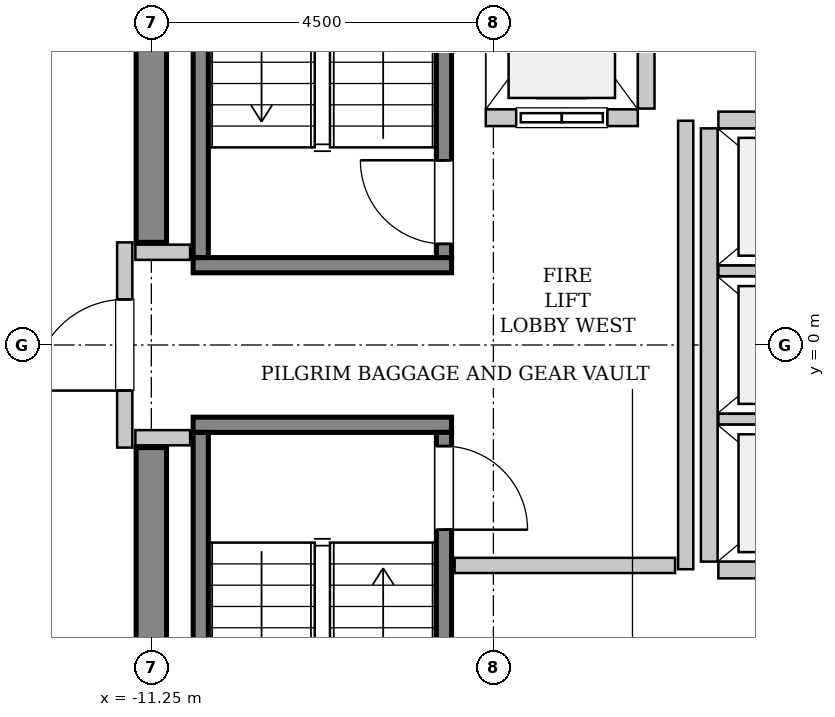
"""IFC4 building model, lengths in metres.
Left out: names, types, materials, properties, quantities, classifications, styles, units other than length and angle.
Written with IfcOpenShell. Run it as: python <this file> out.ifc"""

import sys

from ifc_helpers import new_model, si_unit, direction, frame, frame_2d, origin, place, context, subcontext, project, spatial, rectangle, extrude, source, transform, mapped, element, fill, save


model = new_model("IFC4")
c1 = context("Model", 3, precision=1e-05, world=origin(), true_north=direction((0.0, 1.0)))
c2 = subcontext(c1, "Body", "Model", "MODEL_VIEW")
j1 = project(units=[si_unit("LENGTHUNIT", "METRE"), si_unit("PLANEANGLEUNIT", "RADIAN")], contexts=[c1])
p1 = place(None, origin())
s1 = spatial("IfcSite", under=j1, at=p1, CompositionType="ELEMENT")
p2 = place(p1, origin())
s2 = spatial("IfcBuilding", under=s1, at=p2, CompositionType="ELEMENT")
p3 = place(p2, frame((0.0, 0.0, 341.4)))
s3 = spatial("IfcBuildingStorey", under=s2, at=p3, CompositionType="ELEMENT", Elevation=341.4)
m1 = source(origin(), c2, "Body", "SweptSolid", [
    extrude(rectangle(XDim=7.45, YDim=0.4, at=frame_2d((3.725, 0.0))), origin(), (0.0, 0.0, 1.0), 3.8),
])
for number, where, z_axis, x_axis in (
    (1, (-11.25, -8.8, 0.0), (0.0, 0.0, 1.0), (0.0, 1.0, 0.0)),
    (2, (-11.25, 1.35, 0.0), (0.0, 0.0, 1.0), (0.0, 1.0, 0.0)),
):
    element("IfcWall", number, at=place(p3, frame(where, z_axis=z_axis, x_axis=x_axis)), inside=s3, PredefinedType="SHEAR", context=c2, shape_type="MappedRepresentation", body=[
        mapped(m1, transform((0.0, 0.0, 0.0), x_axis=(1.0, 0.0, 0.0), y_axis=(0.0, 1.0, 0.0), z_axis=(0.0, 0.0, 1.0), scale=1.0)),
    ])
m2 = source(origin(), c2, "Body", "SweptSolid", [
    extrude(rectangle(XDim=3.4, YDim=0.2, at=frame_2d((1.7, 0.0))), origin(), (0.0, 0.0, 1.0), 3.8),
])
p4 = place(p3, frame((-7.3, 1.05, 0.0), z_axis=(0.0, 0.0, 1.0), x_axis=(-1.0, 0.0, 0.0)))
e3 = element("IfcWall", 3, at=p4, inside=s3, PredefinedType="SOLIDWALL", context=c2, shape_type="MappedRepresentation", body=[
    mapped(m2, transform((0.0, 0.0, 0.0), x_axis=(1.0, 0.0, 0.0), y_axis=(0.0, 1.0, 0.0), z_axis=(0.0, 0.0, 1.0), scale=1.0)),
])
m3 = source(origin(), c2, "Body", "SweptSolid", [
    extrude(rectangle(XDim=7.1, YDim=0.2, at=frame_2d((3.55, 0.0))), origin(), (0.0, 0.0, 1.0), 3.8),
])
p5 = place(p3, frame((-7.4, 1.15, 0.0), z_axis=(0.0, 0.0, 1.0), x_axis=(0.0, 1.0, 0.0)))
e4 = element("IfcWall", 4, at=p5, inside=s3, PredefinedType="SOLIDWALL", context=c2, shape_type="MappedRepresentation", body=[
    mapped(m3, transform((0.0, 0.0, 0.0), x_axis=(1.0, 0.0, 0.0), y_axis=(0.0, 1.0, 0.0), z_axis=(0.0, 0.0, 1.0), scale=1.0)),
])
p6 = place(p5, frame((0.18, 0.0, 0.0)))
e5 = element("IfcOpeningElement", 5, at=p6, cuts=e4, PredefinedType="OPENING", context=c2, shape_type="SweptSolid", body=[
    extrude(rectangle(XDim=1.1, YDim=2.15, at=frame_2d((0.55, 1.075))), frame((0.0, 0.11, 0.0), z_axis=(0.0, -1.0, 0.0), x_axis=(1.0, 0.0, 0.0)), (0.0, 0.0, 1.0), 0.22),
])
p7 = place(p3, frame((-10.6, 1.15, 0.0), z_axis=(0.0, 0.0, 1.0), x_axis=(0.0, 1.0, 0.0)))
e6 = element("IfcWall", 6, at=p7, inside=s3, PredefinedType="SOLIDWALL", context=c2, shape_type="MappedRepresentation", body=[
    mapped(m3, transform((0.0, 0.0, 0.0), x_axis=(1.0, 0.0, 0.0), y_axis=(0.0, 1.0, 0.0), z_axis=(0.0, 0.0, 1.0), scale=1.0)),
])
p8 = place(p3, frame((-10.7, -1.05, 0.0), z_axis=(0.0, 0.0, 1.0), x_axis=(1.0, 0.0, 0.0)))
e7 = element("IfcWall", 7, at=p8, inside=s3, PredefinedType="SOLIDWALL", context=c2, shape_type="MappedRepresentation", body=[
    mapped(m2, transform((0.0, 0.0, 0.0), x_axis=(1.0, 0.0, 0.0), y_axis=(0.0, 1.0, 0.0), z_axis=(0.0, 0.0, 1.0), scale=1.0)),
])
p9 = place(p3, frame((-10.6, -1.15, 0.0), z_axis=(0.0, 0.0, 1.0), x_axis=(0.0, -1.0, 0.0)))
e8 = element("IfcWall", 8, at=p9, inside=s3, PredefinedType="SOLIDWALL", context=c2, shape_type="MappedRepresentation", body=[
    mapped(m3, transform((0.0, 0.0, 0.0), x_axis=(1.0, 0.0, 0.0), y_axis=(0.0, 1.0, 0.0), z_axis=(0.0, 0.0, 1.0), scale=1.0)),
])
p10 = place(p3, frame((-7.4, -1.15, 0.0), z_axis=(0.0, 0.0, 1.0), x_axis=(0.0, -1.0, 0.0)))
e9 = element("IfcWall", 9, at=p10, inside=s3, PredefinedType="SOLIDWALL", context=c2, shape_type="MappedRepresentation", body=[
    mapped(m3, transform((0.0, 0.0, 0.0), x_axis=(1.0, 0.0, 0.0), y_axis=(0.0, 1.0, 0.0), z_axis=(0.0, 0.0, 1.0), scale=1.0)),
])
p11 = place(p10, frame((0.18, 0.0, 0.0)))
e10 = element("IfcOpeningElement", 10, at=p11, cuts=e9, PredefinedType="OPENING", context=c2, shape_type="SweptSolid", body=[
    extrude(rectangle(XDim=1.1, YDim=2.15, at=frame_2d((0.55, 1.075))), frame((0.0, 0.11, 0.0), z_axis=(0.0, -1.0, 0.0), x_axis=(1.0, 0.0, 0.0)), (0.0, 0.0, 1.0), 0.22),
])
m4 = source(origin(), c2, "Body", "SweptSolid", [
    extrude(rectangle(XDim=2.0, YDim=0.22, at=frame_2d((1.0, 0.0))), origin(), (0.0, 0.0, 1.0), 3.535),
])
p12 = place(p3, frame((-6.85, 2.99, 0.0), z_axis=(0.0, 0.0, 1.0), x_axis=(1.0, 0.0, 0.0)))
e11 = element("IfcWall", 11, at=p12, inside=s3, PredefinedType="SOLIDWALL", context=c2, shape_type="MappedRepresentation", body=[
    mapped(m4, transform((0.0, 0.0, 0.0), x_axis=(1.0, 0.0, 0.0), y_axis=(0.0, 1.0, 0.0), z_axis=(0.0, 0.0, 1.0), scale=1.0)),
])
p13 = place(p12, frame((0.4, 0.0, 0.0)))
e12 = element("IfcOpeningElement", 12, at=p13, cuts=e11, PredefinedType="OPENING", context=c2, shape_type="SweptSolid", body=[
    extrude(rectangle(XDim=1.2, YDim=2.2, at=frame_2d((0.6, 1.1))), frame((0.0, 0.12, 0.0), z_axis=(0.0, -1.0, 0.0), x_axis=(1.0, 0.0, 0.0)), (0.0, 0.0, 1.0), 0.24),
])
m5 = source(origin(), c2, "Body", "SweptSolid", [
    extrude(rectangle(XDim=2.68, YDim=0.22, at=frame_2d((1.34, 0.0))), origin(), (0.0, 0.0, 1.0), 3.535),
])
p14 = place(p3, frame((-4.74, 3.11, 0.0), z_axis=(0.0, 0.0, 1.0), x_axis=(0.0, 1.0, 0.0)))
e13 = element("IfcWall", 13, at=p14, inside=s3, PredefinedType="SOLIDWALL", context=c2, shape_type="MappedRepresentation", body=[
    mapped(m5, transform((0.0, 0.0, 0.0), x_axis=(1.0, 0.0, 0.0), y_axis=(0.0, 1.0, 0.0), z_axis=(0.0, 0.0, 1.0), scale=1.0)),
])
m6 = source(origin(), c2, "Body", "SweptSolid", [
    extrude(rectangle(XDim=5.7, YDim=0.22, at=frame_2d((2.85, 0.0))), origin(), (0.0, 0.0, 1.0), 3.535),
])
p15 = place(p3, frame((-3.91, 2.85, 0.0), z_axis=(0.0, 0.0, 1.0), x_axis=(0.0, -1.0, 0.0)))
e14 = element("IfcWall", 14, at=p15, inside=s3, PredefinedType="SOLIDWALL", context=c2, shape_type="MappedRepresentation", body=[
    mapped(m6, transform((0.0, 0.0, 0.0), x_axis=(1.0, 0.0, 0.0), y_axis=(0.0, 1.0, 0.0), z_axis=(0.0, 0.0, 1.0), scale=1.0)),
])
m7 = source(origin(), c2, "Body", "SweptSolid", [
    extrude(rectangle(XDim=2.13, YDim=0.22, at=frame_2d((1.065, 0.0))), origin(), (0.0, 0.0, 1.0), 3.535),
])
p16 = place(p3, frame((-3.79, -2.96, 0.0), z_axis=(0.0, 0.0, 1.0), x_axis=(1.0, 0.0, 0.0)))
e15 = element("IfcWall", 15, at=p16, inside=s3, PredefinedType="SOLIDWALL", context=c2, shape_type="MappedRepresentation", body=[
    mapped(m7, transform((0.0, 0.0, 0.0), x_axis=(1.0, 0.0, 0.0), y_axis=(0.0, 1.0, 0.0), z_axis=(0.0, 0.0, 1.0), scale=1.0)),
])
m8 = source(origin(), c2, "Body", "SweptSolid", [
    extrude(rectangle(XDim=2.13, YDim=0.14, at=frame_2d((1.065, 0.0))), origin(), (0.0, 0.0, 1.0), 3.535),
])
for number, where, z_axis, x_axis in (
    (16, (-3.79, -0.975, 0.0), (0.0, 0.0, 1.0), (1.0, 0.0, 0.0)),
    (17, (-3.79, 0.975, 0.0), (0.0, 0.0, 1.0), (1.0, 0.0, 0.0)),
):
    element("IfcWall", number, at=place(p3, frame(where, z_axis=z_axis, x_axis=x_axis)), inside=s3, PredefinedType="PARTITIONING", context=c2, shape_type="MappedRepresentation", body=[
        mapped(m8, transform((0.0, 0.0, 0.0), x_axis=(1.0, 0.0, 0.0), y_axis=(0.0, 1.0, 0.0), z_axis=(0.0, 0.0, 1.0), scale=1.0)),
    ])
p17 = place(p3, frame((-1.66, 2.96, 0.0), z_axis=(0.0, 0.0, 1.0), x_axis=(-1.0, 0.0, 0.0)))
e18 = element("IfcWall", 18, at=p17, inside=s3, PredefinedType="SOLIDWALL", context=c2, shape_type="MappedRepresentation", body=[
    mapped(m7, transform((0.0, 0.0, 0.0), x_axis=(1.0, 0.0, 0.0), y_axis=(0.0, 1.0, 0.0), z_axis=(0.0, 0.0, 1.0), scale=1.0)),
])
m9 = source(origin(), c2, "Body", "SweptSolid", [
    extrude(rectangle(XDim=2.7, YDim=0.2, at=frame_2d((1.35, 0.0))), origin(), (0.0, 0.0, 1.0), 2.625),
])
p18 = place(p3, frame((-11.6, -1.35, 0.0), z_axis=(0.0, 0.0, 1.0), x_axis=(0.0, 1.0, 0.0)))
e19 = element("IfcWall", 19, at=p18, inside=s3, PredefinedType="PARTITIONING", context=c2, shape_type="MappedRepresentation", body=[
    mapped(m9, transform((0.0, 0.0, 0.0), x_axis=(1.0, 0.0, 0.0), y_axis=(0.0, 1.0, 0.0), z_axis=(0.0, 0.0, 1.0), scale=1.0)),
])
p19 = place(p18, frame((0.75, 0.0, 0.0)))
e20 = element("IfcOpeningElement", 20, at=p19, cuts=e19, PredefinedType="OPENING", context=c2, shape_type="SweptSolid", body=[
    extrude(rectangle(XDim=1.2, YDim=2.15, at=frame_2d((0.6, 1.075))), frame((0.0, 0.11, 0.0), z_axis=(0.0, -1.0, 0.0), x_axis=(1.0, 0.0, 0.0)), (0.0, 0.0, 1.0), 0.22),
])
m10 = source(origin(), c2, "Body", "SweptSolid", [
    extrude(rectangle(XDim=5.9, YDim=0.2, at=frame_2d((2.95, 0.0))), origin(), (0.0, 0.0, 1.0), 3.535),
])
p20 = place(p3, frame((-4.22, -2.95, 0.0), z_axis=(0.0, 0.0, 1.0), x_axis=(0.0, 1.0, 0.0)))
e21 = element("IfcWall", 21, at=p20, inside=s3, PredefinedType="PARTITIONING", context=c2, shape_type="MappedRepresentation", body=[
    mapped(m10, transform((0.0, 0.0, 0.0), x_axis=(1.0, 0.0, 0.0), y_axis=(0.0, 1.0, 0.0), z_axis=(0.0, 0.0, 1.0), scale=1.0)),
])
m11 = source(origin(), c2, "Body", "SweptSolid", [
    extrude(rectangle(XDim=2.9, YDim=0.2, at=frame_2d((1.45, 0.0))), origin(), (0.0, 0.0, 1.0), 3.535),
])
p21 = place(p3, frame((-7.26, -2.9, 0.0), z_axis=(0.0, 0.0, 1.0), x_axis=(1.0, 0.0, 0.0)))
e22 = element("IfcWall", 22, at=p21, inside=s3, PredefinedType="PARTITIONING", context=c2, shape_type="MappedRepresentation", body=[
    mapped(m11, transform((0.0, 0.0, 0.0), x_axis=(1.0, 0.0, 0.0), y_axis=(0.0, 1.0, 0.0), z_axis=(0.0, 0.0, 1.0), scale=1.0)),
])
m12 = source(origin(), c2, "Body", "SweptSolid", [
    extrude(rectangle(XDim=0.72, YDim=0.2, at=frame_2d((0.36, 0.0))), origin(), (0.0, 0.0, 1.0), 3.535),
])
for number, where, z_axis, x_axis in (
    (23, (-11.46, 1.22, 0.0), (0.0, 0.0, 1.0), (1.0, 0.0, 0.0)),
    (24, (-11.46, -1.22, 0.0), (0.0, 0.0, 1.0), (1.0, 0.0, 0.0)),
):
    element("IfcWall", number, at=place(p3, frame(where, z_axis=z_axis, x_axis=x_axis)), inside=s3, PredefinedType="PARTITIONING", context=c2, shape_type="MappedRepresentation", body=[
        mapped(m12, transform((0.0, 0.0, 0.0), x_axis=(1.0, 0.0, 0.0), y_axis=(0.0, 1.0, 0.0), z_axis=(0.0, 0.0, 1.0), scale=1.0)),
    ])
m13 = source(origin(), c2, "Body", "SweptSolid", [
    extrude(rectangle(XDim=1.1, YDim=2.15, at=frame_2d((0.55, 1.075))), frame((0.0, 0.025, 0.0), z_axis=(0.0, -1.0, 0.0), x_axis=(1.0, 0.0, 0.0)), (0.0, 0.0, 1.0), 0.05),
])
p22 = place(p6, origin())
e25 = element("IfcDoor", 25, at=p22, inside=s3, OperationType="SINGLE_SWING_RIGHT", PredefinedType="DOOR", context=c2, shape_type="MappedRepresentation", body=[
    mapped(m13, transform((0.0, 0.0, 0.0), x_axis=(1.0, 0.0, 0.0), y_axis=(0.0, 1.0, 0.0), z_axis=(0.0, 0.0, 1.0), scale=1.0)),
])
fill(e5, e25)
p23 = place(p11, origin())
e26 = element("IfcDoor", 26, at=p23, inside=s3, OperationType="SINGLE_SWING_RIGHT", PredefinedType="DOOR", context=c2, shape_type="MappedRepresentation", body=[
    mapped(m13, transform((0.0, 0.0, 0.0), x_axis=(1.0, 0.0, 0.0), y_axis=(0.0, 1.0, 0.0), z_axis=(0.0, 0.0, 1.0), scale=1.0)),
])
fill(e10, e26)
m14 = source(origin(), c2, "Body", "SweptSolid", [
    extrude(rectangle(XDim=1.2, YDim=2.2, at=frame_2d((0.6, 1.1))), frame((0.0, 0.025, 0.0), z_axis=(0.0, -1.0, 0.0), x_axis=(1.0, 0.0, 0.0)), (0.0, 0.0, 1.0), 0.05),
])
p24 = place(p13, origin())
e27 = element("IfcDoor", 27, at=p24, inside=s3, OperationType="SLIDING_TO_LEFT", PredefinedType="DOOR", context=c2, shape_type="MappedRepresentation", body=[
    mapped(m14, transform((0.0, 0.0, 0.0), x_axis=(1.0, 0.0, 0.0), y_axis=(0.0, 1.0, 0.0), z_axis=(0.0, 0.0, 1.0), scale=1.0)),
])
fill(e12, e27)
m15 = source(origin(), c2, "Body", "SweptSolid", [
    extrude(rectangle(XDim=1.2, YDim=2.15, at=frame_2d((0.6, 1.075))), frame((0.0, 0.025, 0.0), z_axis=(0.0, -1.0, 0.0), x_axis=(1.0, 0.0, 0.0)), (0.0, 0.0, 1.0), 0.05),
])
p25 = place(p19, origin())
e28 = element("IfcDoor", 28, at=p25, inside=s3, OperationType="SINGLE_SWING_LEFT", PredefinedType="DOOR", context=c2, shape_type="MappedRepresentation", body=[
    mapped(m15, transform((0.0, 0.0, 0.0), x_axis=(1.0, 0.0, 0.0), y_axis=(0.0, 1.0, 0.0), z_axis=(0.0, 0.0, 1.0), scale=1.0)),
])
fill(e20, e28)
save(model, sys.argv[1])
